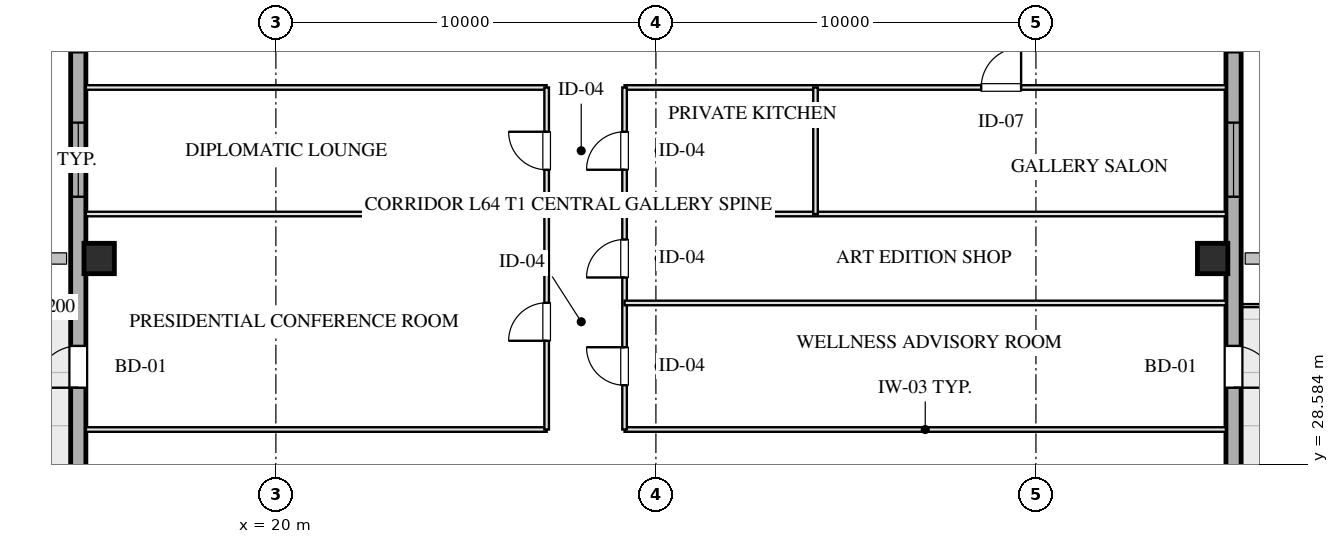
"""IFC4 building model, lengths in metres.
Left out: names, types, materials, properties, quantities, classifications, styles, units other than length and angle.
Written with IfcOpenShell. Run it as: python <this file> out.ifc"""

import sys

from ifc_helpers import new_model, si_unit, direction, frame, frame_2d, origin, origin_2d, place, context, subcontext, project, spatial, rectangle, hollow_rectangle, extrude, element, fill, save


model = new_model("IFC4")
c1 = context("Model", 3, precision=1e-05, world=origin(), true_north=direction((0.0, 1.0)))
c2 = subcontext(c1, "Body", "Model", "MODEL_VIEW")
j1 = project(units=[si_unit("LENGTHUNIT", "METRE"), si_unit("PLANEANGLEUNIT", "RADIAN")], contexts=[c1])
p1 = place(None, origin())
s1 = spatial("IfcSite", under=j1, at=p1, CompositionType="ELEMENT")
p2 = place(p1, origin())
s2 = spatial("IfcBuilding", under=s1, at=p2, CompositionType="ELEMENT")
p3 = place(p2, frame((0.0, 0.0, 237.6)))
s3 = spatial("IfcBuildingStorey", under=s2, at=p3, CompositionType="ELEMENT", Elevation=237.6)
for number, where, z_axis, x_axis in (
    (1, (15.35, 34.0, 0.0), (0.0, 0.0, 1.0), (1.0, 0.0, 0.0)),
    (2, (44.65, 34.0, 0.0), (0.0, 0.0, 1.0), (1.0, 0.0, 0.0)),
):
    element("IfcColumn", number, at=place(p3, frame(where, z_axis=z_axis, x_axis=x_axis)), inside=s3, PredefinedType="COLUMN", context=c2, shape_type="SweptSolid", body=[
        extrude(hollow_rectangle(XDim=0.8, YDim=0.8, WallThickness=0.028, at=origin_2d()), origin(), (0.0, 0.0, 1.0), 3.201),
    ])
p4 = place(p3, frame((14.8, 13.1, 0.0), z_axis=(0.0, 0.0, 1.0), x_axis=(0.0, 1.0, 0.0)))
e3 = element("IfcWall", 3, at=p4, inside=s3, PredefinedType="SOLIDWALL", context=c2, shape_type="SweptSolid", body=[
    extrude(rectangle(XDim=41.8, YDim=0.4, at=frame_2d((20.9, 0.0))), origin(), (0.0, 0.0, 1.0), 2.36),
])
p5 = place(p4, frame((22.525, 0.0, 0.75)))
e4 = element("IfcOpeningElement", 4, at=p5, cuts=e3, PredefinedType="OPENING", context=c2, shape_type="SweptSolid", body=[
    extrude(rectangle(XDim=1.95, YDim=1.21, at=frame_2d((0.975, 0.605))), frame((0.0, 0.21, 0.0), z_axis=(0.0, -1.0, 0.0), x_axis=(1.0, 0.0, 0.0)), (0.0, 0.0, 1.0), 0.42),
])
p6 = place(p4, frame((26.325, 0.0, 0.75)))
e5 = element("IfcOpeningElement", 5, at=p6, cuts=e3, PredefinedType="OPENING", context=c2, shape_type="SweptSolid", body=[
    extrude(rectangle(XDim=1.95, YDim=1.21, at=frame_2d((0.975, 0.605))), frame((0.0, 0.21, 0.0), z_axis=(0.0, -1.0, 0.0), x_axis=(1.0, 0.0, 0.0)), (0.0, 0.0, 1.0), 0.42),
])
p7 = place(p4, frame((17.5, 0.0, 0.0)))
e6 = element("IfcOpeningElement", 6, at=p7, cuts=e3, PredefinedType="OPENING", context=c2, shape_type="SweptSolid", body=[
    extrude(rectangle(XDim=1.1, YDim=2.15, at=frame_2d((0.55, 1.075))), frame((0.0, 0.21, 0.0), z_axis=(0.0, -1.0, 0.0), x_axis=(1.0, 0.0, 0.0)), (0.0, 0.0, 1.0), 0.42),
])
p8 = place(p3, frame((45.2, 54.9, 0.0), z_axis=(0.0, 0.0, 1.0), x_axis=(0.0, -1.0, 0.0)))
e7 = element("IfcWall", 7, at=p8, inside=s3, PredefinedType="SOLIDWALL", context=c2, shape_type="SweptSolid", body=[
    extrude(rectangle(XDim=41.8, YDim=0.4, at=frame_2d((20.9, 0.0))), origin(), (0.0, 0.0, 1.0), 2.36),
])
p9 = place(p8, frame((17.325, 0.0, 0.75)))
e8 = element("IfcOpeningElement", 8, at=p9, cuts=e7, PredefinedType="OPENING", context=c2, shape_type="SweptSolid", body=[
    extrude(rectangle(XDim=1.95, YDim=1.21, at=frame_2d((0.975, 0.605))), frame((0.0, 0.21, 0.0), z_axis=(0.0, -1.0, 0.0), x_axis=(1.0, 0.0, 0.0)), (0.0, 0.0, 1.0), 0.42),
])
p10 = place(p8, frame((13.525, 0.0, 0.75)))
e9 = element("IfcOpeningElement", 9, at=p10, cuts=e7, PredefinedType="OPENING", context=c2, shape_type="SweptSolid", body=[
    extrude(rectangle(XDim=1.95, YDim=1.21, at=frame_2d((0.975, 0.605))), frame((0.0, 0.21, 0.0), z_axis=(0.0, -1.0, 0.0), x_axis=(1.0, 0.0, 0.0)), (0.0, 0.0, 1.0), 0.42),
])
p11 = place(p8, frame((23.2, 0.0, 0.0)))
e10 = element("IfcOpeningElement", 10, at=p11, cuts=e7, PredefinedType="OPENING", context=c2, shape_type="SweptSolid", body=[
    extrude(rectangle(XDim=1.1, YDim=2.15, at=frame_2d((0.55, 1.075))), frame((0.0, 0.21, 0.0), z_axis=(0.0, -1.0, 0.0), x_axis=(1.0, 0.0, 0.0)), (0.0, 0.0, 1.0), 0.42),
])
p12 = place(p3, frame((15.0, 29.5, 0.0), z_axis=(0.0, 0.0, 1.0), x_axis=(1.0, 0.0, 0.0)))
e11 = element("IfcWall", 11, at=p12, inside=s3, PredefinedType="PARTITIONING", context=c2, shape_type="SweptSolid", body=[
    extrude(rectangle(XDim=12.125, YDim=0.12, at=frame_2d((6.062, 0.0))), origin(), (0.0, 0.0, 1.0), 2.925),
])
p13 = place(p3, frame((29.175, 29.5, 0.0), z_axis=(0.0, 0.0, 1.0), x_axis=(1.0, 0.0, 0.0)))
e12 = element("IfcWall", 12, at=p13, inside=s3, PredefinedType="PARTITIONING", context=c2, shape_type="SweptSolid", body=[
    extrude(rectangle(XDim=15.825, YDim=0.12, at=frame_2d((7.913, 0.0))), origin(), (0.0, 0.0, 1.0), 2.925),
])
p14 = place(p3, frame((15.0, 38.5, 0.0), z_axis=(0.0, 0.0, 1.0), x_axis=(1.0, 0.0, 0.0)))
e13 = element("IfcWall", 13, at=p14, inside=s3, PredefinedType="PARTITIONING", context=c2, shape_type="SweptSolid", body=[
    extrude(rectangle(XDim=12.125, YDim=0.12, at=frame_2d((6.062, 0.0))), origin(), (0.0, 0.0, 1.0), 2.925),
])
p15 = place(p3, frame((29.175, 38.5, 0.0), z_axis=(0.0, 0.0, 1.0), x_axis=(1.0, 0.0, 0.0)))
e14 = element("IfcWall", 14, at=p15, inside=s3, PredefinedType="PARTITIONING", context=c2, shape_type="SweptSolid", body=[
    extrude(rectangle(XDim=15.825, YDim=0.12, at=frame_2d((7.913, 0.0))), origin(), (0.0, 0.0, 1.0), 2.925),
])
p16 = place(p15, frame((9.385, 0.0, 0.0)))
e15 = element("IfcOpeningElement", 15, at=p16, cuts=e14, PredefinedType="OPENING", context=c2, shape_type="SweptSolid", body=[
    extrude(rectangle(XDim=1.05, YDim=2.05, at=frame_2d((0.525, 1.025))), frame((0.0, 0.07, 0.0), z_axis=(0.0, -1.0, 0.0), x_axis=(1.0, 0.0, 0.0)), (0.0, 0.0, 1.0), 0.14),
])
p17 = place(p3, frame((27.125, 29.5, 0.0), z_axis=(0.0, 0.0, 1.0), x_axis=(0.0, 1.0, 0.0)))
e16 = element("IfcWall", 16, at=p17, inside=s3, PredefinedType="PARTITIONING", context=c2, shape_type="SweptSolid", body=[
    extrude(rectangle(XDim=9.0, YDim=0.12, at=frame_2d((4.5, 0.0))), origin(), (0.0, 0.0, 1.0), 2.925),
])
p18 = place(p17, frame((2.335, 0.0, 0.0)))
e17 = element("IfcOpeningElement", 17, at=p18, cuts=e16, PredefinedType="OPENING", context=c2, shape_type="SweptSolid", body=[
    extrude(rectangle(XDim=1.0, YDim=2.05, at=frame_2d((0.5, 1.025))), frame((0.0, 0.07, 0.0), z_axis=(0.0, -1.0, 0.0), x_axis=(1.0, 0.0, 0.0)), (0.0, 0.0, 1.0), 0.14),
])
p19 = place(p17, frame((6.835, 0.0, 0.0)))
e18 = element("IfcOpeningElement", 18, at=p19, cuts=e16, PredefinedType="OPENING", context=c2, shape_type="SweptSolid", body=[
    extrude(rectangle(XDim=1.0, YDim=2.05, at=frame_2d((0.5, 1.025))), frame((0.0, 0.07, 0.0), z_axis=(0.0, -1.0, 0.0), x_axis=(1.0, 0.0, 0.0)), (0.0, 0.0, 1.0), 0.14),
])
p20 = place(p3, frame((29.175, 29.5, 0.0), z_axis=(0.0, 0.0, 1.0), x_axis=(0.0, 1.0, 0.0)))
e19 = element("IfcWall", 19, at=p20, inside=s3, PredefinedType="PARTITIONING", context=c2, shape_type="SweptSolid", body=[
    extrude(rectangle(XDim=9.0, YDim=0.12, at=frame_2d((4.5, 0.0))), origin(), (0.0, 0.0, 1.0), 2.925),
])
p21 = place(p20, frame((1.165, 0.0, 0.0)))
e20 = element("IfcOpeningElement", 20, at=p21, cuts=e19, PredefinedType="OPENING", context=c2, shape_type="SweptSolid", body=[
    extrude(rectangle(XDim=1.0, YDim=2.05, at=frame_2d((0.5, 1.025))), frame((0.0, 0.07, 0.0), z_axis=(0.0, -1.0, 0.0), x_axis=(1.0, 0.0, 0.0)), (0.0, 0.0, 1.0), 0.14),
])
p22 = place(p20, frame((4.0, 0.0, 0.0)))
e21 = element("IfcOpeningElement", 21, at=p22, cuts=e19, PredefinedType="OPENING", context=c2, shape_type="SweptSolid", body=[
    extrude(rectangle(XDim=1.0, YDim=2.05, at=frame_2d((0.5, 1.025))), frame((0.0, 0.07, 0.0), z_axis=(0.0, -1.0, 0.0), x_axis=(1.0, 0.0, 0.0)), (0.0, 0.0, 1.0), 0.14),
])
p23 = place(p20, frame((6.835, 0.0, 0.0)))
e22 = element("IfcOpeningElement", 22, at=p23, cuts=e19, PredefinedType="OPENING", context=c2, shape_type="SweptSolid", body=[
    extrude(rectangle(XDim=1.0, YDim=2.05, at=frame_2d((0.5, 1.025))), frame((0.0, 0.07, 0.0), z_axis=(0.0, -1.0, 0.0), x_axis=(1.0, 0.0, 0.0)), (0.0, 0.0, 1.0), 0.14),
])
p24 = place(p3, frame((15.0, 35.17, 0.0), z_axis=(0.0, 0.0, 1.0), x_axis=(1.0, 0.0, 0.0)))
e23 = element("IfcWall", 23, at=p24, inside=s3, PredefinedType="PARTITIONING", context=c2, shape_type="SweptSolid", body=[
    extrude(rectangle(XDim=12.125, YDim=0.12, at=frame_2d((6.062, 0.0))), origin(), (0.0, 0.0, 1.0), 2.925),
])
for number, where, z_axis, x_axis in (
    (24, (29.175, 32.83, 0.0), (0.0, 0.0, 1.0), (1.0, 0.0, 0.0)),
    (25, (29.175, 35.17, 0.0), (0.0, 0.0, 1.0), (1.0, 0.0, 0.0)),
):
    element("IfcWall", number, at=place(p3, frame(where, z_axis=z_axis, x_axis=x_axis)), inside=s3, PredefinedType="PARTITIONING", context=c2, shape_type="SweptSolid", body=[
        extrude(rectangle(XDim=15.825, YDim=0.12, at=frame_2d((7.913, 0.0))), origin(), (0.0, 0.0, 1.0), 2.925),
    ])
p25 = place(p3, frame((34.2, 35.17, 0.0), z_axis=(0.0, 0.0, 1.0), x_axis=(0.0, 1.0, 0.0)))
e26 = element("IfcWall", 26, at=p25, inside=s3, PredefinedType="PARTITIONING", context=c2, shape_type="SweptSolid", body=[
    extrude(rectangle(XDim=3.33, YDim=0.12, at=frame_2d((1.665, 0.0))), origin(), (0.0, 0.0, 1.0), 2.925),
])
p26 = place(p5, origin())
e27 = element("IfcWindow", 27, at=p26, inside=s3, PartitioningType="TRIPLE_PANEL_VERTICAL", PredefinedType="WINDOW", context=c2, shape_type="SweptSolid", body=[
    extrude(rectangle(XDim=1.95, YDim=1.21, at=frame_2d((0.975, 0.605))), frame((0.0, 0.03, 0.0), z_axis=(0.0, -1.0, 0.0), x_axis=(1.0, 0.0, 0.0)), (0.0, 0.0, 1.0), 0.06),
])
fill(e4, e27)
p27 = place(p9, origin())
e28 = element("IfcWindow", 28, at=p27, inside=s3, PartitioningType="TRIPLE_PANEL_VERTICAL", PredefinedType="WINDOW", context=c2, shape_type="SweptSolid", body=[
    extrude(rectangle(XDim=1.95, YDim=1.21, at=frame_2d((0.975, 0.605))), frame((0.0, 0.03, 0.0), z_axis=(0.0, -1.0, 0.0), x_axis=(1.0, 0.0, 0.0)), (0.0, 0.0, 1.0), 0.06),
])
fill(e8, e28)
p28 = place(p7, origin())
e29 = element("IfcDoor", 29, at=p28, inside=s3, OperationType="SINGLE_SWING_LEFT", PredefinedType="DOOR", context=c2, shape_type="SweptSolid", body=[
    extrude(rectangle(XDim=1.1, YDim=2.15, at=frame_2d((0.55, 1.075))), frame((0.0, 0.025, 0.0), z_axis=(0.0, -1.0, 0.0), x_axis=(1.0, 0.0, 0.0)), (0.0, 0.0, 1.0), 0.05),
])
fill(e6, e29)
p29 = place(p11, origin())
e30 = element("IfcDoor", 30, at=p29, inside=s3, OperationType="SINGLE_SWING_RIGHT", PredefinedType="DOOR", context=c2, shape_type="SweptSolid", body=[
    extrude(rectangle(XDim=1.1, YDim=2.15, at=frame_2d((0.55, 1.075))), frame((0.0, 0.025, 0.0), z_axis=(0.0, -1.0, 0.0), x_axis=(1.0, 0.0, 0.0)), (0.0, 0.0, 1.0), 0.05),
])
fill(e10, e30)
p30 = place(p16, origin())
e31 = element("IfcDoor", 31, at=p30, inside=s3, OperationType="SINGLE_SWING_RIGHT", PredefinedType="DOOR", context=c2, shape_type="SweptSolid", body=[
    extrude(rectangle(XDim=1.05, YDim=2.05, at=frame_2d((0.525, 1.025))), frame((0.0, 0.025, 0.0), z_axis=(0.0, -1.0, 0.0), x_axis=(1.0, 0.0, 0.0)), (0.0, 0.0, 1.0), 0.05),
])
fill(e15, e31)
p31 = place(p18, origin())
e32 = element("IfcDoor", 32, at=p31, inside=s3, OperationType="SINGLE_SWING_LEFT", PredefinedType="DOOR", context=c2, shape_type="SweptSolid", body=[
    extrude(rectangle(XDim=1.0, YDim=2.05, at=frame_2d((0.5, 1.025))), frame((0.0, 0.025, 0.0), z_axis=(0.0, -1.0, 0.0), x_axis=(1.0, 0.0, 0.0)), (0.0, 0.0, 1.0), 0.05),
])
fill(e17, e32)
p32 = place(p19, origin())
e33 = element("IfcDoor", 33, at=p32, inside=s3, OperationType="SINGLE_SWING_RIGHT", PredefinedType="DOOR", context=c2, shape_type="SweptSolid", body=[
    extrude(rectangle(XDim=1.0, YDim=2.05, at=frame_2d((0.5, 1.025))), frame((0.0, 0.025, 0.0), z_axis=(0.0, -1.0, 0.0), x_axis=(1.0, 0.0, 0.0)), (0.0, 0.0, 1.0), 0.05),
])
fill(e18, e33)
p33 = place(p21, origin())
e34 = element("IfcDoor", 34, at=p33, inside=s3, OperationType="SINGLE_SWING_RIGHT", PredefinedType="DOOR", context=c2, shape_type="SweptSolid", body=[
    extrude(rectangle(XDim=1.0, YDim=2.05, at=frame_2d((0.5, 1.025))), frame((0.0, 0.025, 0.0), z_axis=(0.0, -1.0, 0.0), x_axis=(1.0, 0.0, 0.0)), (0.0, 0.0, 1.0), 0.05),
])
fill(e20, e34)
p34 = place(p22, origin())
e35 = element("IfcDoor", 35, at=p34, inside=s3, OperationType="SINGLE_SWING_LEFT", PredefinedType="DOOR", context=c2, shape_type="SweptSolid", body=[
    extrude(rectangle(XDim=1.0, YDim=2.05, at=frame_2d((0.5, 1.025))), frame((0.0, 0.025, 0.0), z_axis=(0.0, -1.0, 0.0), x_axis=(1.0, 0.0, 0.0)), (0.0, 0.0, 1.0), 0.05),
])
fill(e21, e35)
p35 = place(p23, origin())
e36 = element("IfcDoor", 36, at=p35, inside=s3, OperationType="SINGLE_SWING_LEFT", PredefinedType="DOOR", context=c2, shape_type="SweptSolid", body=[
    extrude(rectangle(XDim=1.0, YDim=2.05, at=frame_2d((0.5, 1.025))), frame((0.0, 0.025, 0.0), z_axis=(0.0, -1.0, 0.0), x_axis=(1.0, 0.0, 0.0)), (0.0, 0.0, 1.0), 0.05),
])
fill(e22, e36)
save(model, sys.argv[1])
